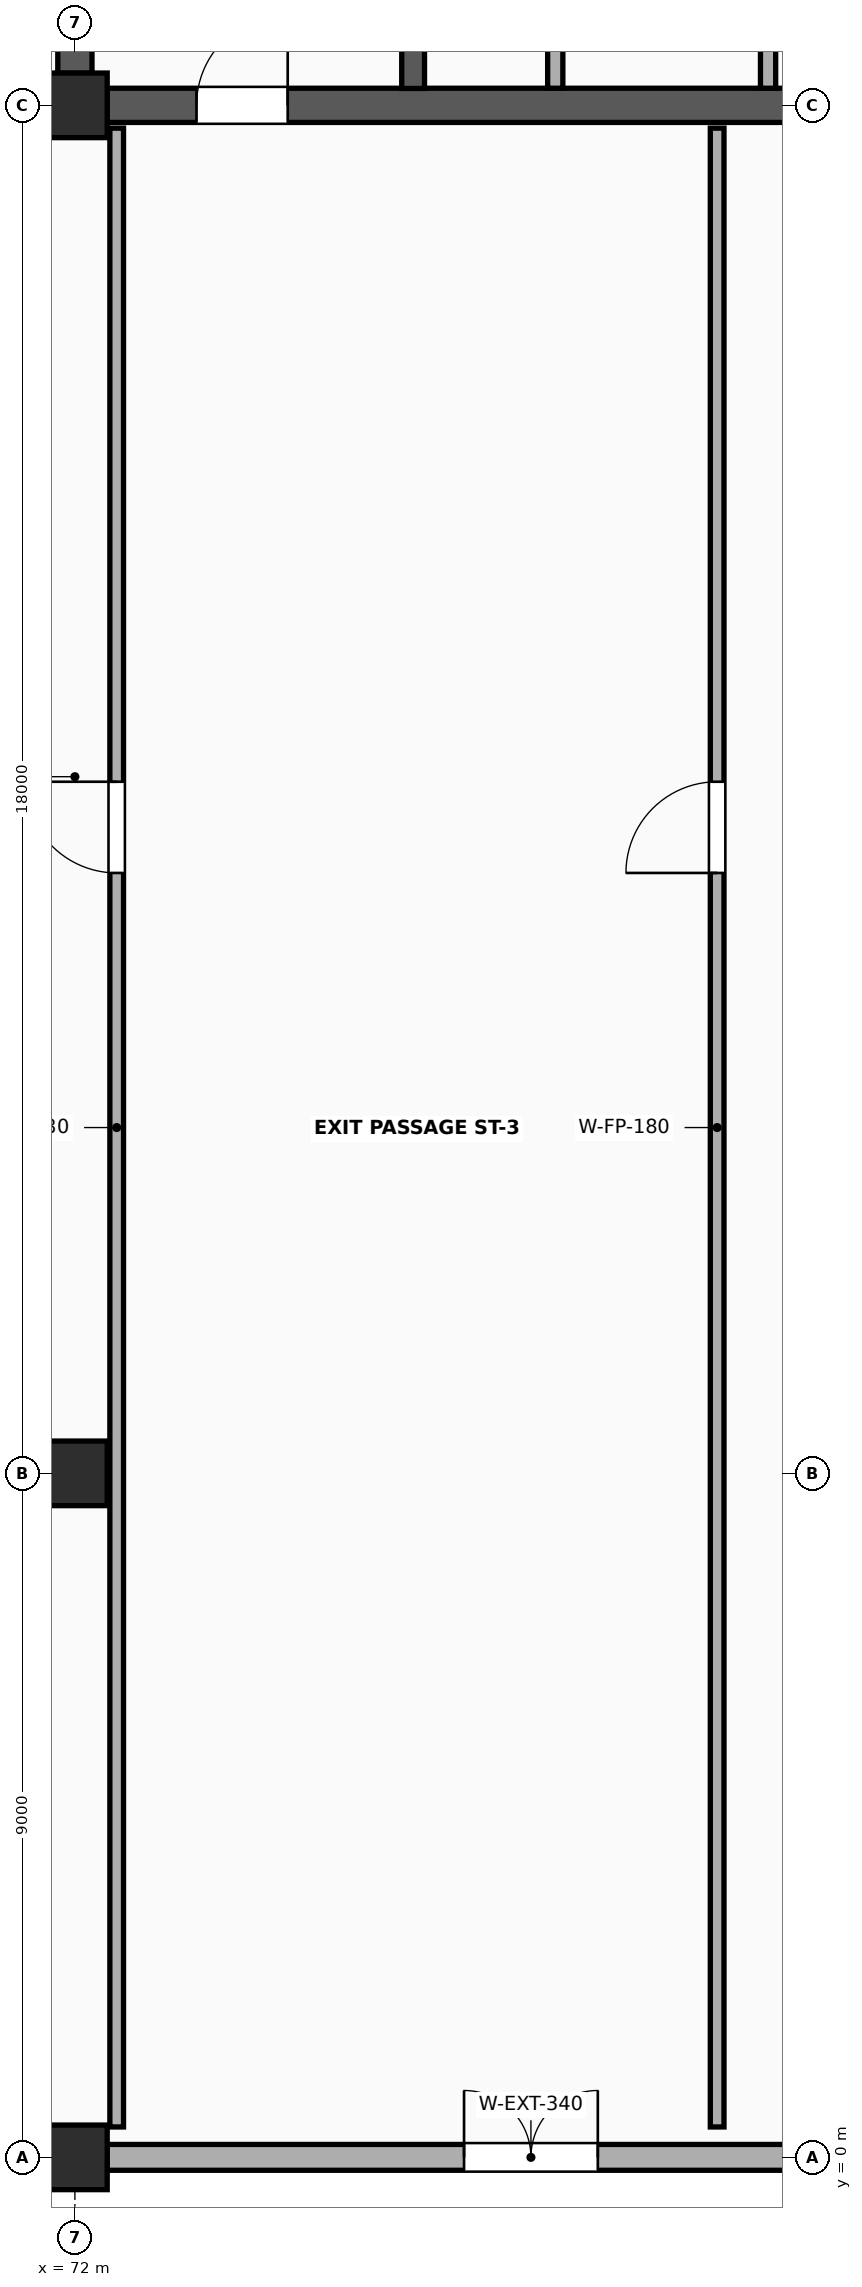
"""IFC4 building model, lengths in metres.
Left out: names, types, materials, properties, quantities, classifications, styles, units other than length and angle.
Written with IfcOpenShell. Run it as: python <this file> out.ifc"""

import sys

from ifc_helpers import new_model, si_unit, direction, frame, frame_2d, origin, origin_2d, place, context, subcontext, project, spatial, rectangle, circle, extrude, element, fill, save


model = new_model("IFC4")
c1 = context("Model", 3, precision=1e-05, world=origin(), true_north=direction((0.0, 1.0)))
c2 = subcontext(c1, "Body", "Model", "MODEL_VIEW")
j1 = project(units=[si_unit("LENGTHUNIT", "METRE"), si_unit("PLANEANGLEUNIT", "RADIAN")], contexts=[c1])
p1 = place(None, origin())
s1 = spatial("IfcSite", under=j1, at=p1, CompositionType="ELEMENT")
p2 = place(p1, origin())
s2 = spatial("IfcBuilding", under=s1, at=p2, CompositionType="ELEMENT")
p3 = place(p2, origin())
s3 = spatial("IfcBuildingStorey", under=s2, at=p3, CompositionType="ELEMENT", Elevation=0.0)
p4 = place(p3, frame((72.0, 0.0, 0.0), z_axis=(0.0, 0.0, 1.0), x_axis=(1.0, 0.0, 0.0)))
e1 = element("IfcColumn", 1, at=p4, inside=s3, PredefinedType="COLUMN", context=c2, shape_type="SweptSolid", body=[
    extrude(circle(Radius=0.425, at=origin_2d()), origin(), (0.0, 0.0, 1.0), 5.4),
])
for number, where, z_axis, x_axis in (
    (2, (72.0, 9.0, 0.0), (0.0, 0.0, 1.0), (1.0, 0.0, 0.0)),
    (3, (72.0, 27.0, 0.0), (0.0, 0.0, 1.0), (1.0, 0.0, 0.0)),
):
    element("IfcColumn", number, at=place(p3, frame(where, z_axis=z_axis, x_axis=x_axis)), inside=s3, PredefinedType="COLUMN", context=c2, shape_type="SweptSolid", body=[
        extrude(rectangle(XDim=0.85, YDim=0.85, at=origin_2d()), origin(), (0.0, 0.0, 1.0), 5.4),
    ])
p5 = place(p3, frame((72.422, 27.0, 0.0), z_axis=(0.0, 0.0, 1.0), x_axis=(1.0, 0.0, 0.0)))
e4 = element("IfcWall", 4, at=p5, inside=s3, PredefinedType="SHEAR", context=c2, shape_type="SweptSolid", body=[
    extrude(rectangle(XDim=11.156, YDim=0.45, at=frame_2d((5.578, 0.0))), origin(), (0.0, 0.0, 1.0), 5.203),
])
p6 = place(p5, frame((1.178, 0.0, 0.0)))
e5 = element("IfcOpeningElement", 5, at=p6, cuts=e4, PredefinedType="OPENING", context=c2, shape_type="SweptSolid", body=[
    extrude(rectangle(XDim=1.2, YDim=2.2, at=frame_2d((0.6, 1.1))), frame((0.0, 0.24, 0.0), z_axis=(0.0, -1.0, 0.0), x_axis=(1.0, 0.0, 0.0)), (0.0, 0.0, 1.0), 0.48),
])
p7 = place(p3, frame((72.0, 27.422, 0.0), z_axis=(0.0, 0.0, 1.0), x_axis=(0.0, 1.0, 0.0)))
e6 = element("IfcWall", 6, at=p7, inside=s3, PredefinedType="SHEAR", context=c2, shape_type="SweptSolid", body=[
    extrude(rectangle(XDim=11.356, YDim=0.45, at=frame_2d((5.678, 0.0))), origin(), (0.0, 0.0, 1.0), 5.203),
])
p8 = place(p3, frame((76.45, 27.222, 0.0), z_axis=(0.0, 0.0, 1.0), x_axis=(0.0, 1.0, 0.0)))
e7 = element("IfcWall", 7, at=p8, inside=s3, PredefinedType="SHEAR", context=c2, shape_type="SweptSolid", body=[
    extrude(rectangle(XDim=11.556, YDim=0.3, at=frame_2d((5.778, 0.0))), origin(), (0.0, 0.0, 1.0), 5.203),
])
p9 = place(p8, frame((0.9, 0.0, 0.0)))
e8 = element("IfcOpeningElement", 8, at=p9, cuts=e7, PredefinedType="OPENING", context=c2, shape_type="SweptSolid", body=[
    extrude(rectangle(XDim=1.1, YDim=2.2, at=frame_2d((0.55, 1.1))), frame((0.0, 0.165, 0.0), z_axis=(0.0, -1.0, 0.0), x_axis=(1.0, 0.0, 0.0)), (0.0, 0.0, 1.0), 0.33),
])
for number, where, z_axis, x_axis in (
    (9, (78.32, 27.225, 0.0), (0.0, 0.0, 1.0), (0.0, 1.0, 0.0)),
    (10, (81.12, 27.225, 0.0), (0.0, 0.0, 1.0), (0.0, 1.0, 0.0)),
):
    element("IfcWall", number, at=place(p3, frame(where, z_axis=z_axis, x_axis=x_axis)), inside=s3, PredefinedType="SOLIDWALL", context=c2, shape_type="SweptSolid", body=[
        extrude(rectangle(XDim=2.855, YDim=0.2, at=frame_2d((1.427, 0.0))), origin(), (0.0, 0.0, 1.0), 5.193),
    ])
p10 = place(p3, frame((72.423, 0.0, 0.0), z_axis=(0.0, 0.0, 1.0), x_axis=(1.0, 0.0, 0.0)))
e11 = element("IfcWall", 11, at=p10, inside=s3, PredefinedType="SOLIDWALL", context=c2, shape_type="SweptSolid", body=[
    extrude(rectangle(XDim=11.154, YDim=0.34, at=frame_2d((5.577, 0.0))), origin(), (0.0, 0.0, 1.0), 3.85),
])
p11 = place(p10, frame((4.697, 0.0, 0.0)))
e12 = element("IfcOpeningElement", 12, at=p11, cuts=e11, PredefinedType="OPENING", context=c2, shape_type="SweptSolid", body=[
    extrude(rectangle(XDim=1.76, YDim=2.36, at=frame_2d((0.88, 1.18))), frame((0.0, 0.185, 0.0), z_axis=(0.0, -1.0, 0.0), x_axis=(1.0, 0.0, 0.0)), (0.0, 0.0, 1.0), 0.37),
])
p12 = place(p3, frame((72.55, 0.4, 0.0), z_axis=(0.0, 0.0, 1.0), x_axis=(0.0, 1.0, 0.0)))
e13 = element("IfcWall", 13, at=p12, inside=s3, PredefinedType="SOLIDWALL", context=c2, shape_type="SweptSolid", body=[
    extrude(rectangle(XDim=26.3, YDim=0.18, at=frame_2d((13.15, 0.0))), origin(), (0.0, 0.0, 1.0), 2.6),
])
p13 = place(p12, frame((16.5, 0.0, 0.0)))
e14 = element("IfcOpeningElement", 14, at=p13, cuts=e13, PredefinedType="OPENING", context=c2, shape_type="SweptSolid", body=[
    extrude(rectangle(XDim=1.2, YDim=2.2, at=frame_2d((0.6, 1.1))), frame((0.0, 0.105, 0.0), z_axis=(0.0, -1.0, 0.0), x_axis=(1.0, 0.0, 0.0)), (0.0, 0.0, 1.0), 0.21),
])
p14 = place(p3, frame((80.45, 0.4, 0.0), z_axis=(0.0, 0.0, 1.0), x_axis=(0.0, 1.0, 0.0)))
e15 = element("IfcWall", 15, at=p14, inside=s3, PredefinedType="SOLIDWALL", context=c2, shape_type="SweptSolid", body=[
    extrude(rectangle(XDim=26.3, YDim=0.18, at=frame_2d((13.15, 0.0))), origin(), (0.0, 0.0, 1.0), 2.6),
])
p15 = place(p14, frame((16.5, 0.0, 0.0)))
e16 = element("IfcOpeningElement", 16, at=p15, cuts=e15, PredefinedType="OPENING", context=c2, shape_type="SweptSolid", body=[
    extrude(rectangle(XDim=1.2, YDim=2.2, at=frame_2d((0.6, 1.1))), frame((0.0, 0.105, 0.0), z_axis=(0.0, -1.0, 0.0), x_axis=(1.0, 0.0, 0.0)), (0.0, 0.0, 1.0), 0.21),
])
p16 = place(p11, frame((1.76, 0.0, 0.0), z_axis=(0.0, 0.0, 1.0), x_axis=(-1.0, 0.0, 0.0)))
e17 = element("IfcDoor", 17, at=p16, inside=s3, OperationType="DOUBLE_DOOR_SINGLE_SWING", PredefinedType="DOOR", context=c2, shape_type="SweptSolid", body=[
    extrude(rectangle(XDim=1.76, YDim=2.36, at=frame_2d((0.88, 1.18))), frame((0.0, 0.025, 0.0), z_axis=(0.0, -1.0, 0.0), x_axis=(1.0, 0.0, 0.0)), (0.0, 0.0, 1.0), 0.05),
])
fill(e12, e17)
p17 = place(p6, frame((1.2, 0.0, 0.0), z_axis=(0.0, 0.0, 1.0), x_axis=(-1.0, 0.0, 0.0)))
e18 = element("IfcDoor", 18, at=p17, inside=s3, OperationType="SINGLE_SWING_RIGHT", PredefinedType="DOOR", context=c2, shape_type="SweptSolid", body=[
    extrude(rectangle(XDim=1.2, YDim=2.2, at=frame_2d((0.6, 1.1))), frame((0.0, 0.025, 0.0), z_axis=(0.0, -1.0, 0.0), x_axis=(1.0, 0.0, 0.0)), (0.0, 0.0, 1.0), 0.05),
])
fill(e5, e18)
p18 = place(p13, frame((1.2, 0.0, 0.0), z_axis=(0.0, 0.0, 1.0), x_axis=(-1.0, 0.0, 0.0)))
e19 = element("IfcDoor", 19, at=p18, inside=s3, OperationType="SINGLE_SWING_RIGHT", PredefinedType="DOOR", context=c2, shape_type="SweptSolid", body=[
    extrude(rectangle(XDim=1.2, YDim=2.2, at=frame_2d((0.6, 1.1))), frame((0.0, 0.025, 0.0), z_axis=(0.0, -1.0, 0.0), x_axis=(1.0, 0.0, 0.0)), (0.0, 0.0, 1.0), 0.05),
])
fill(e14, e19)
p19 = place(p15, frame((1.2, 0.0, 0.0), z_axis=(0.0, 0.0, 1.0), x_axis=(-1.0, 0.0, 0.0)))
e20 = element("IfcDoor", 20, at=p19, inside=s3, OperationType="SINGLE_SWING_LEFT", PredefinedType="DOOR", context=c2, shape_type="SweptSolid", body=[
    extrude(rectangle(XDim=1.2, YDim=2.2, at=frame_2d((0.6, 1.1))), frame((0.0, 0.025, 0.0), z_axis=(0.0, -1.0, 0.0), x_axis=(1.0, 0.0, 0.0)), (0.0, 0.0, 1.0), 0.05),
])
fill(e16, e20)
save(model, sys.argv[1])
